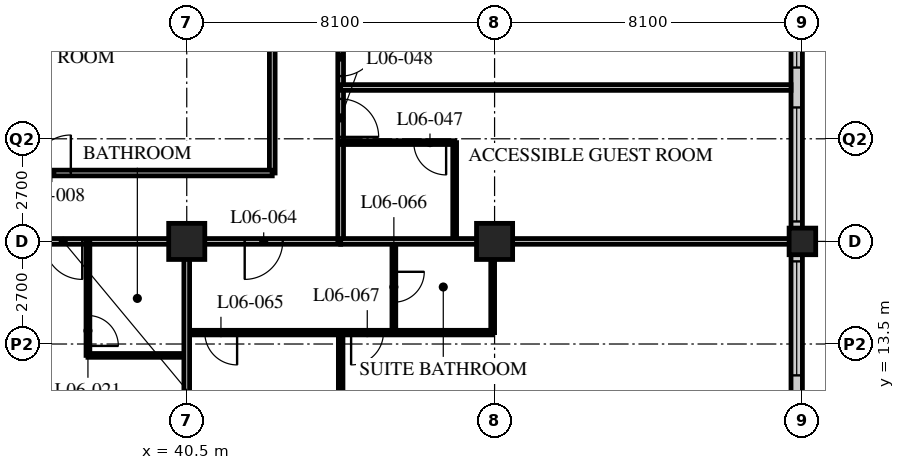
"""IFC4 building model, lengths in metres.
Left out: names, types, materials, properties, quantities, classifications, styles, units other than length and angle.
Written with IfcOpenShell. Run it as: python <this file> out.ifc"""

import sys

from ifc_helpers import new_model, si_unit, direction, frame, frame_2d, origin, origin_2d, place, context, subcontext, project, spatial, rectangle, hollow_rectangle, extrude, element, fill, save


model = new_model("IFC4")
c1 = context("Model", 3, precision=1e-05, world=origin(), true_north=direction((0.0, 1.0)))
c2 = subcontext(c1, "Body", "Model", "MODEL_VIEW")
j1 = project(units=[si_unit("LENGTHUNIT", "METRE"), si_unit("PLANEANGLEUNIT", "RADIAN")], contexts=[c1])
p1 = place(None, origin())
s1 = spatial("IfcSite", under=j1, at=p1, CompositionType="ELEMENT")
p2 = place(p1, origin())
s2 = spatial("IfcBuilding", under=s1, at=p2, CompositionType="ELEMENT")
p3 = place(p2, frame((0.0, 0.0, 33.0)))
s3 = spatial("IfcBuildingStorey", under=s2, at=p3, CompositionType="ELEMENT", Elevation=33.0)
for number, where, z_axis, x_axis in (
    (1, (40.5, 16.2, 0.0), (0.0, 0.0, 1.0), (1.0, 0.0, 0.0)),
    (2, (48.6, 16.2, 0.0), (0.0, 0.0, 1.0), (1.0, 0.0, 0.0)),
):
    element("IfcColumn", number, at=place(p3, frame(where, z_axis=z_axis, x_axis=x_axis)), inside=s3, PredefinedType="COLUMN", context=c2, shape_type="SweptSolid", body=[
        extrude(hollow_rectangle(XDim=0.95, YDim=0.95, WallThickness=0.095, at=origin_2d()), origin(), (0.0, 0.0, 1.0), 3.4),
    ])
p4 = place(p3, frame((56.7, 16.2, 0.0), z_axis=(0.0, 0.0, 1.0), x_axis=(1.0, 0.0, 0.0)))
e3 = element("IfcColumn", 3, at=p4, inside=s3, PredefinedType="COLUMN", context=c2, shape_type="SweptSolid", body=[
    extrude(hollow_rectangle(XDim=0.7, YDim=0.7, WallThickness=0.06, at=origin_2d()), origin(), (0.0, 0.0, 1.0), 3.4),
])
p5 = place(p3, frame((56.55, 8.4, 0.0), z_axis=(0.0, 0.0, 1.0), x_axis=(0.0, 1.0, 0.0)))
e4 = element("IfcWall", 4, at=p5, inside=s3, PredefinedType="SOLIDWALL", context=c2, shape_type="SweptSolid", body=[
    extrude(rectangle(XDim=32.1, YDim=0.3, at=frame_2d((16.05, 0.0))), origin(), (0.0, 0.0, 1.0), 3.19),
])
p6 = place(p5, frame((0.225, 0.0, 0.9)))
e5 = element("IfcOpeningElement", 5, at=p6, cuts=e4, PredefinedType="OPENING", context=c2, shape_type="SweptSolid", body=[
    extrude(rectangle(XDim=3.0, YDim=2.0, at=frame_2d((1.5, 1.0))), frame((0.0, 0.16, 0.0), z_axis=(0.0, -1.0, 0.0), x_axis=(1.0, 0.0, 0.0)), (0.0, 0.0, 1.0), 0.32),
])
p7 = place(p5, frame((4.275, 0.0, 0.9)))
e6 = element("IfcOpeningElement", 6, at=p7, cuts=e4, PredefinedType="OPENING", context=c2, shape_type="SweptSolid", body=[
    extrude(rectangle(XDim=3.0, YDim=2.0, at=frame_2d((1.5, 1.0))), frame((0.0, 0.16, 0.0), z_axis=(0.0, -1.0, 0.0), x_axis=(1.0, 0.0, 0.0)), (0.0, 0.0, 1.0), 0.32),
])
p8 = place(p5, frame((8.325, 0.0, 0.9)))
e7 = element("IfcOpeningElement", 7, at=p8, cuts=e4, PredefinedType="OPENING", context=c2, shape_type="SweptSolid", body=[
    extrude(rectangle(XDim=3.0, YDim=2.0, at=frame_2d((1.5, 1.0))), frame((0.0, 0.16, 0.0), z_axis=(0.0, -1.0, 0.0), x_axis=(1.0, 0.0, 0.0)), (0.0, 0.0, 1.0), 0.32),
])
p9 = place(p5, frame((12.375, 0.0, 0.9)))
e8 = element("IfcOpeningElement", 8, at=p9, cuts=e4, PredefinedType="OPENING", context=c2, shape_type="SweptSolid", body=[
    extrude(rectangle(XDim=3.0, YDim=2.0, at=frame_2d((1.5, 1.0))), frame((0.0, 0.16, 0.0), z_axis=(0.0, -1.0, 0.0), x_axis=(1.0, 0.0, 0.0)), (0.0, 0.0, 1.0), 0.32),
])
p10 = place(p5, frame((16.425, 0.0, 0.9)))
e9 = element("IfcOpeningElement", 9, at=p10, cuts=e4, PredefinedType="OPENING", context=c2, shape_type="SweptSolid", body=[
    extrude(rectangle(XDim=3.0, YDim=2.0, at=frame_2d((1.5, 1.0))), frame((0.0, 0.16, 0.0), z_axis=(0.0, -1.0, 0.0), x_axis=(1.0, 0.0, 0.0)), (0.0, 0.0, 1.0), 0.32),
])
p11 = place(p5, frame((20.475, 0.0, 0.9)))
e10 = element("IfcOpeningElement", 10, at=p11, cuts=e4, PredefinedType="OPENING", context=c2, shape_type="SweptSolid", body=[
    extrude(rectangle(XDim=3.0, YDim=2.0, at=frame_2d((1.5, 1.0))), frame((0.0, 0.16, 0.0), z_axis=(0.0, -1.0, 0.0), x_axis=(1.0, 0.0, 0.0)), (0.0, 0.0, 1.0), 0.32),
])
p12 = place(p5, frame((24.525, 0.0, 0.9)))
e11 = element("IfcOpeningElement", 11, at=p12, cuts=e4, PredefinedType="OPENING", context=c2, shape_type="SweptSolid", body=[
    extrude(rectangle(XDim=3.0, YDim=2.0, at=frame_2d((1.5, 1.0))), frame((0.0, 0.16, 0.0), z_axis=(0.0, -1.0, 0.0), x_axis=(1.0, 0.0, 0.0)), (0.0, 0.0, 1.0), 0.32),
])
p13 = place(p5, frame((28.575, 0.0, 0.9)))
e12 = element("IfcOpeningElement", 12, at=p13, cuts=e4, PredefinedType="OPENING", context=c2, shape_type="SweptSolid", body=[
    extrude(rectangle(XDim=3.0, YDim=2.0, at=frame_2d((1.5, 1.0))), frame((0.0, 0.16, 0.0), z_axis=(0.0, -1.0, 0.0), x_axis=(1.0, 0.0, 0.0)), (0.0, 0.0, 1.0), 0.32),
])
p14 = place(p3, frame((12.15, 16.2, 0.0), z_axis=(0.0, 0.0, 1.0), x_axis=(1.0, 0.0, 0.0)))
e13 = element("IfcWall", 13, at=p14, inside=s3, PredefinedType="PARTITIONING", context=c2, shape_type="SweptSolid", body=[
    extrude(rectangle(XDim=32.4, YDim=0.15, at=frame_2d((16.2, 0.0))), origin(), (0.0, 0.0, 1.0), 2.578),
])
p15 = place(p14, frame((6.5, 0.0, 0.0)))
e14 = element("IfcOpeningElement", 14, at=p15, cuts=e13, PredefinedType="OPENING", context=c2, shape_type="SweptSolid", body=[
    extrude(rectangle(XDim=1.0, YDim=2.1, at=frame_2d((0.5, 1.05))), frame((0.0, 0.085, 0.0), z_axis=(0.0, -1.0, 0.0), x_axis=(1.0, 0.0, 0.0)), (0.0, 0.0, 1.0), 0.17),
])
p16 = place(p14, frame((8.4, 0.0, 0.0)))
e15 = element("IfcOpeningElement", 15, at=p16, cuts=e13, PredefinedType="OPENING", context=c2, shape_type="SweptSolid", body=[
    extrude(rectangle(XDim=1.0, YDim=2.1, at=frame_2d((0.5, 1.05))), frame((0.0, 0.085, 0.0), z_axis=(0.0, -1.0, 0.0), x_axis=(1.0, 0.0, 0.0)), (0.0, 0.0, 1.0), 0.17),
])
p17 = place(p14, frame((14.6, 0.0, 0.0)))
e16 = element("IfcOpeningElement", 16, at=p17, cuts=e13, PredefinedType="OPENING", context=c2, shape_type="SweptSolid", body=[
    extrude(rectangle(XDim=1.0, YDim=2.1, at=frame_2d((0.5, 1.05))), frame((0.0, 0.085, 0.0), z_axis=(0.0, -1.0, 0.0), x_axis=(1.0, 0.0, 0.0)), (0.0, 0.0, 1.0), 0.17),
])
p18 = place(p14, frame((16.5, 0.0, 0.0)))
e17 = element("IfcOpeningElement", 17, at=p18, cuts=e13, PredefinedType="OPENING", context=c2, shape_type="SweptSolid", body=[
    extrude(rectangle(XDim=1.0, YDim=2.1, at=frame_2d((0.5, 1.05))), frame((0.0, 0.085, 0.0), z_axis=(0.0, -1.0, 0.0), x_axis=(1.0, 0.0, 0.0)), (0.0, 0.0, 1.0), 0.17),
])
p19 = place(p14, frame((23.0, 0.0, 0.0)))
e18 = element("IfcOpeningElement", 18, at=p19, cuts=e13, PredefinedType="OPENING", context=c2, shape_type="SweptSolid", body=[
    extrude(rectangle(XDim=1.0, YDim=2.1, at=frame_2d((0.5, 1.05))), frame((0.0, 0.085, 0.0), z_axis=(0.0, -1.0, 0.0), x_axis=(1.0, 0.0, 0.0)), (0.0, 0.0, 1.0), 0.17),
])
p20 = place(p14, frame((24.6, 0.0, 0.0)))
e19 = element("IfcOpeningElement", 19, at=p20, cuts=e13, PredefinedType="OPENING", context=c2, shape_type="SweptSolid", body=[
    extrude(rectangle(XDim=1.0, YDim=2.1, at=frame_2d((0.5, 1.05))), frame((0.0, 0.085, 0.0), z_axis=(0.0, -1.0, 0.0), x_axis=(1.0, 0.0, 0.0)), (0.0, 0.0, 1.0), 0.17),
])
p21 = place(p14, frame((1.525, 0.0, 0.0)))
e20 = element("IfcOpeningElement", 20, at=p21, cuts=e13, PredefinedType="OPENING", context=c2, shape_type="SweptSolid", body=[
    extrude(rectangle(XDim=1.0, YDim=2.1, at=frame_2d((0.5, 1.05))), frame((0.0, 0.085, 0.0), z_axis=(0.0, -1.0, 0.0), x_axis=(1.0, 0.0, 0.0)), (0.0, 0.0, 1.0), 0.17),
])
p22 = place(p14, frame((29.875, 0.0, 0.0)))
e21 = element("IfcOpeningElement", 21, at=p22, cuts=e13, PredefinedType="OPENING", context=c2, shape_type="SweptSolid", body=[
    extrude(rectangle(XDim=1.0, YDim=2.1, at=frame_2d((0.5, 1.05))), frame((0.0, 0.085, 0.0), z_axis=(0.0, -1.0, 0.0), x_axis=(1.0, 0.0, 0.0)), (0.0, 0.0, 1.0), 0.17),
])
p23 = place(p3, frame((44.55, 16.2, 0.0), z_axis=(0.0, 0.0, 1.0), x_axis=(0.0, 1.0, 0.0)))
e22 = element("IfcWall", 22, at=p23, inside=s3, PredefinedType="PARTITIONING", context=c2, shape_type="SweptSolid", body=[
    extrude(rectangle(XDim=26.1, YDim=0.15, at=frame_2d((13.05, 0.0))), origin(), (0.0, 0.0, 1.0), 3.19),
])
p24 = place(p23, frame((2.75, 0.0, 0.0)))
e23 = element("IfcOpeningElement", 23, at=p24, cuts=e22, PredefinedType="OPENING", context=c2, shape_type="SweptSolid", body=[
    extrude(rectangle(XDim=1.0, YDim=2.1, at=frame_2d((0.5, 1.05))), frame((0.0, 0.085, 0.0), z_axis=(0.0, -1.0, 0.0), x_axis=(1.0, 0.0, 0.0)), (0.0, 0.0, 1.0), 0.17),
])
p25 = place(p23, frame((4.35, 0.0, 0.0)))
e24 = element("IfcOpeningElement", 24, at=p25, cuts=e22, PredefinedType="OPENING", context=c2, shape_type="SweptSolid", body=[
    extrude(rectangle(XDim=1.0, YDim=2.1, at=frame_2d((0.5, 1.05))), frame((0.0, 0.085, 0.0), z_axis=(0.0, -1.0, 0.0), x_axis=(1.0, 0.0, 0.0)), (0.0, 0.0, 1.0), 0.17),
])
p26 = place(p23, frame((8.4, 0.0, 0.0)))
e25 = element("IfcOpeningElement", 25, at=p26, cuts=e22, PredefinedType="OPENING", context=c2, shape_type="SweptSolid", body=[
    extrude(rectangle(XDim=1.0, YDim=2.1, at=frame_2d((0.5, 1.05))), frame((0.0, 0.085, 0.0), z_axis=(0.0, -1.0, 0.0), x_axis=(1.0, 0.0, 0.0)), (0.0, 0.0, 1.0), 0.17),
])
p27 = place(p23, frame((14.6, 0.0, 0.0)))
e26 = element("IfcOpeningElement", 26, at=p27, cuts=e22, PredefinedType="OPENING", context=c2, shape_type="SweptSolid", body=[
    extrude(rectangle(XDim=1.0, YDim=2.1, at=frame_2d((0.5, 1.05))), frame((0.0, 0.085, 0.0), z_axis=(0.0, -1.0, 0.0), x_axis=(1.0, 0.0, 0.0)), (0.0, 0.0, 1.0), 0.17),
])
p28 = place(p23, frame((18.65, 0.0, 0.0)))
e27 = element("IfcOpeningElement", 27, at=p28, cuts=e22, PredefinedType="OPENING", context=c2, shape_type="SweptSolid", body=[
    extrude(rectangle(XDim=1.0, YDim=2.1, at=frame_2d((0.5, 1.05))), frame((0.0, 0.085, 0.0), z_axis=(0.0, -1.0, 0.0), x_axis=(1.0, 0.0, 0.0)), (0.0, 0.0, 1.0), 0.17),
])
p29 = place(p23, frame((22.65, 0.0, 0.0)))
e28 = element("IfcOpeningElement", 28, at=p29, cuts=e22, PredefinedType="OPENING", context=c2, shape_type="SweptSolid", body=[
    extrude(rectangle(XDim=1.0, YDim=2.1, at=frame_2d((0.5, 1.05))), frame((0.0, 0.085, 0.0), z_axis=(0.0, -1.0, 0.0), x_axis=(1.0, 0.0, 0.0)), (0.0, 0.0, 1.0), 0.17),
])
p30 = place(p3, frame((42.75, 18.0, 0.0), z_axis=(0.0, 0.0, 1.0), x_axis=(0.0, 1.0, 0.0)))
e29 = element("IfcWall", 29, at=p30, inside=s3, PredefinedType="PARTITIONING", context=c2, shape_type="SweptSolid", body=[
    extrude(rectangle(XDim=22.5, YDim=0.15, at=frame_2d((11.25, 0.0))), origin(), (0.0, 0.0, 1.0), 3.19),
])
p31 = place(p30, frame((9.85, 0.0, 0.0)))
e30 = element("IfcOpeningElement", 30, at=p31, cuts=e29, PredefinedType="OPENING", context=c2, shape_type="SweptSolid", body=[
    extrude(rectangle(XDim=1.0, YDim=2.1, at=frame_2d((0.5, 1.05))), frame((0.0, 0.085, 0.0), z_axis=(0.0, -1.0, 0.0), x_axis=(1.0, 0.0, 0.0)), (0.0, 0.0, 1.0), 0.17),
])
p32 = place(p30, frame((17.95, 0.0, 0.0)))
e31 = element("IfcOpeningElement", 31, at=p32, cuts=e29, PredefinedType="OPENING", context=c2, shape_type="SweptSolid", body=[
    extrude(rectangle(XDim=1.0, YDim=2.1, at=frame_2d((0.5, 1.05))), frame((0.0, 0.085, 0.0), z_axis=(0.0, -1.0, 0.0), x_axis=(1.0, 0.0, 0.0)), (0.0, 0.0, 1.0), 0.17),
])
p33 = place(p3, frame((29.56, 18.0, 0.0), z_axis=(0.0, 0.0, 1.0), x_axis=(1.0, 0.0, 0.0)))
e32 = element("IfcWall", 32, at=p33, inside=s3, PredefinedType="PARTITIONING", context=c2, shape_type="SweptSolid", body=[
    extrude(rectangle(XDim=13.19, YDim=0.15, at=frame_2d((6.595, 0.0))), origin(), (0.0, 0.0, 1.0), 3.19),
])
p34 = place(p33, frame((0.29, 0.0, 0.0)))
e33 = element("IfcOpeningElement", 33, at=p34, cuts=e32, PredefinedType="OPENING", context=c2, shape_type="SweptSolid", body=[
    extrude(rectangle(XDim=1.0, YDim=2.1, at=frame_2d((0.5, 1.05))), frame((0.0, 0.085, 0.0), z_axis=(0.0, -1.0, 0.0), x_axis=(1.0, 0.0, 0.0)), (0.0, 0.0, 1.0), 0.17),
])
p35 = place(p33, frame((6.89, 0.0, 0.0)))
e34 = element("IfcOpeningElement", 34, at=p35, cuts=e32, PredefinedType="OPENING", context=c2, shape_type="SweptSolid", body=[
    extrude(rectangle(XDim=1.0, YDim=2.1, at=frame_2d((0.5, 1.05))), frame((0.0, 0.085, 0.0), z_axis=(0.0, -1.0, 0.0), x_axis=(1.0, 0.0, 0.0)), (0.0, 0.0, 1.0), 0.17),
])
p36 = place(p3, frame((37.9, 13.2, 0.0), z_axis=(0.0, 0.0, 1.0), x_axis=(1.0, 0.0, 0.0)))
e35 = element("IfcWall", 35, at=p36, inside=s3, PredefinedType="PARTITIONING", context=c2, shape_type="SweptSolid", body=[
    extrude(rectangle(XDim=2.6, YDim=0.1, at=frame_2d((1.3, 0.0))), origin(), (0.0, 0.0, 1.0), 3.19),
])
p37 = place(p3, frame((37.9, 16.2, 0.0), z_axis=(0.0, 0.0, 1.0), x_axis=(0.0, -1.0, 0.0)))
e36 = element("IfcWall", 36, at=p37, inside=s3, PredefinedType="PARTITIONING", context=c2, shape_type="SweptSolid", body=[
    extrude(rectangle(XDim=3.0, YDim=0.1, at=frame_2d((1.5, 0.0))), origin(), (0.0, 0.0, 1.0), 3.19),
])
p38 = place(p37, frame((1.95, 0.0, 0.0)))
e37 = element("IfcOpeningElement", 37, at=p38, cuts=e36, PredefinedType="OPENING", context=c2, shape_type="SweptSolid", body=[
    extrude(rectangle(XDim=0.8, YDim=2.1, at=frame_2d((0.4, 1.05))), frame((0.0, 0.06, 0.0), z_axis=(0.0, -1.0, 0.0), x_axis=(1.0, 0.0, 0.0)), (0.0, 0.0, 1.0), 0.12),
])
p39 = place(p3, frame((47.55, 16.2, 0.0), z_axis=(0.0, 0.0, 1.0), x_axis=(0.0, 1.0, 0.0)))
e38 = element("IfcWall", 38, at=p39, inside=s3, PredefinedType="PARTITIONING", context=c2, shape_type="SweptSolid", body=[
    extrude(rectangle(XDim=2.6, YDim=0.1, at=frame_2d((1.3, 0.0))), origin(), (0.0, 0.0, 1.0), 3.19),
])
p40 = place(p3, frame((44.55, 18.8, 0.0), z_axis=(0.0, 0.0, 1.0), x_axis=(1.0, 0.0, 0.0)))
e39 = element("IfcWall", 39, at=p40, inside=s3, PredefinedType="PARTITIONING", context=c2, shape_type="SweptSolid", body=[
    extrude(rectangle(XDim=3.0, YDim=0.1, at=frame_2d((1.5, 0.0))), origin(), (0.0, 0.0, 1.0), 3.19),
])
p41 = place(p40, frame((1.925, 0.0, 0.0)))
e40 = element("IfcOpeningElement", 40, at=p41, cuts=e39, PredefinedType="OPENING", context=c2, shape_type="SweptSolid", body=[
    extrude(rectangle(XDim=0.85, YDim=2.1, at=frame_2d((0.425, 1.05))), frame((0.0, 0.06, 0.0), z_axis=(0.0, -1.0, 0.0), x_axis=(1.0, 0.0, 0.0)), (0.0, 0.0, 1.0), 0.12),
])
p42 = place(p3, frame((44.55, 20.25, 0.0), z_axis=(0.0, 0.0, 1.0), x_axis=(1.0, 0.0, 0.0)))
e41 = element("IfcWall", 41, at=p42, inside=s3, PredefinedType="PARTITIONING", context=c2, shape_type="SweptSolid", body=[
    extrude(rectangle(XDim=11.85, YDim=0.15, at=frame_2d((5.925, 0.0))), origin(), (0.0, 0.0, 1.0), 3.19),
])
p43 = place(p3, frame((40.5, 13.8, 0.0), z_axis=(0.0, 0.0, 1.0), x_axis=(1.0, 0.0, 0.0)))
e42 = element("IfcWall", 42, at=p43, inside=s3, PredefinedType="PARTITIONING", context=c2, shape_type="SweptSolid", body=[
    extrude(rectangle(XDim=8.05, YDim=0.12, at=frame_2d((4.025, 0.0))), origin(), (0.0, 0.0, 1.0), 3.19),
])
p44 = place(p43, frame((0.475, 0.0, 0.0)))
e43 = element("IfcOpeningElement", 43, at=p44, cuts=e42, PredefinedType="OPENING", context=c2, shape_type="SweptSolid", body=[
    extrude(rectangle(XDim=0.85, YDim=2.1, at=frame_2d((0.425, 1.05))), frame((0.0, 0.07, 0.0), z_axis=(0.0, -1.0, 0.0), x_axis=(1.0, 0.0, 0.0)), (0.0, 0.0, 1.0), 0.14),
])
p45 = place(p43, frame((4.325, 0.0, 0.0)))
e44 = element("IfcOpeningElement", 44, at=p45, cuts=e42, PredefinedType="OPENING", context=c2, shape_type="SweptSolid", body=[
    extrude(rectangle(XDim=0.85, YDim=2.1, at=frame_2d((0.425, 1.05))), frame((0.0, 0.07, 0.0), z_axis=(0.0, -1.0, 0.0), x_axis=(1.0, 0.0, 0.0)), (0.0, 0.0, 1.0), 0.14),
])
p46 = place(p3, frame((45.95, 16.2, 0.0), z_axis=(0.0, 0.0, 1.0), x_axis=(0.0, -1.0, 0.0)))
e45 = element("IfcWall", 45, at=p46, inside=s3, PredefinedType="PARTITIONING", context=c2, shape_type="SweptSolid", body=[
    extrude(rectangle(XDim=2.4, YDim=0.1, at=frame_2d((1.2, 0.0))), origin(), (0.0, 0.0, 1.0), 3.19),
])
p47 = place(p46, frame((0.8, 0.0, 0.0)))
e46 = element("IfcOpeningElement", 46, at=p47, cuts=e45, PredefinedType="OPENING", context=c2, shape_type="SweptSolid", body=[
    extrude(rectangle(XDim=0.8, YDim=2.1, at=frame_2d((0.4, 1.05))), frame((0.0, 0.06, 0.0), z_axis=(0.0, -1.0, 0.0), x_axis=(1.0, 0.0, 0.0)), (0.0, 0.0, 1.0), 0.12),
])
p48 = place(p3, frame((48.55, 16.2, 0.0), z_axis=(0.0, 0.0, 1.0), x_axis=(0.0, -1.0, 0.0)))
e47 = element("IfcWall", 47, at=p48, inside=s3, PredefinedType="PARTITIONING", context=c2, shape_type="SweptSolid", body=[
    extrude(rectangle(XDim=2.4, YDim=0.1, at=frame_2d((1.2, 0.0))), origin(), (0.0, 0.0, 1.0), 2.578),
])
p49 = place(p3, frame((44.55, 13.8, 0.0), z_axis=(0.0, 0.0, 1.0), x_axis=(0.0, -1.0, 0.0)))
e48 = element("IfcWall", 48, at=p49, inside=s3, PredefinedType="PARTITIONING", context=c2, shape_type="SweptSolid", body=[
    extrude(rectangle(XDim=13.5, YDim=0.12, at=frame_2d((6.75, 0.0))), origin(), (0.0, 0.0, 1.0), 3.19),
])
p50 = place(p3, frame((44.55, 16.2, 0.0), z_axis=(0.0, 0.0, 1.0), x_axis=(1.0, 0.0, 0.0)))
e49 = element("IfcWall", 49, at=p50, inside=s3, PredefinedType="PARTITIONING", context=c2, shape_type="SweptSolid", body=[
    extrude(rectangle(XDim=11.85, YDim=0.15, at=frame_2d((5.925, 0.0))), origin(), (0.0, 0.0, 1.0), 2.578),
])
p51 = place(p3, frame((40.5, 16.2, 0.0), z_axis=(0.0, 0.0, 1.0), x_axis=(0.0, -1.0, 0.0)))
e50 = element("IfcWall", 50, at=p51, inside=s3, PredefinedType="PARTITIONING", context=c2, shape_type="SweptSolid", body=[
    extrude(rectangle(XDim=15.9, YDim=0.15, at=frame_2d((7.95, 0.0))), origin(), (0.0, 0.0, 1.0), 2.578),
])
p52 = place(p7, origin())
e51 = element("IfcWindow", 51, at=p52, inside=s3, PartitioningType="SINGLE_PANEL", PredefinedType="WINDOW", context=c2, shape_type="SweptSolid", body=[
    extrude(rectangle(XDim=3.0, YDim=2.0, at=frame_2d((1.5, 1.0))), frame((0.0, 0.03, 0.0), z_axis=(0.0, -1.0, 0.0), x_axis=(1.0, 0.0, 0.0)), (0.0, 0.0, 1.0), 0.06),
])
fill(e6, e51)
p53 = place(p8, origin())
e52 = element("IfcWindow", 52, at=p53, inside=s3, PartitioningType="SINGLE_PANEL", PredefinedType="WINDOW", context=c2, shape_type="SweptSolid", body=[
    extrude(rectangle(XDim=3.0, YDim=2.0, at=frame_2d((1.5, 1.0))), frame((0.0, 0.03, 0.0), z_axis=(0.0, -1.0, 0.0), x_axis=(1.0, 0.0, 0.0)), (0.0, 0.0, 1.0), 0.06),
])
fill(e7, e52)
p54 = place(p9, origin())
e53 = element("IfcWindow", 53, at=p54, inside=s3, PartitioningType="SINGLE_PANEL", PredefinedType="WINDOW", context=c2, shape_type="SweptSolid", body=[
    extrude(rectangle(XDim=3.0, YDim=2.0, at=frame_2d((1.5, 1.0))), frame((0.0, 0.03, 0.0), z_axis=(0.0, -1.0, 0.0), x_axis=(1.0, 0.0, 0.0)), (0.0, 0.0, 1.0), 0.06),
])
fill(e8, e53)
p55 = place(p35, origin())
e54 = element("IfcDoor", 54, at=p55, inside=s3, OperationType="SINGLE_SWING_RIGHT", PredefinedType="DOOR", context=c2, shape_type="SweptSolid", body=[
    extrude(rectangle(XDim=1.0, YDim=2.1, at=frame_2d((0.5, 1.05))), frame((0.0, 0.025, 0.0), z_axis=(0.0, -1.0, 0.0), x_axis=(1.0, 0.0, 0.0)), (0.0, 0.0, 1.0), 0.05),
])
fill(e34, e54)
p56 = place(p38, origin())
e55 = element("IfcDoor", 55, at=p56, inside=s3, OperationType="SINGLE_SWING_RIGHT", PredefinedType="DOOR", context=c2, shape_type="SweptSolid", body=[
    extrude(rectangle(XDim=0.8, YDim=2.1, at=frame_2d((0.4, 1.05))), frame((0.0, 0.025, 0.0), z_axis=(0.0, -1.0, 0.0), x_axis=(1.0, 0.0, 0.0)), (0.0, 0.0, 1.0), 0.05),
])
fill(e37, e55)
p57 = place(p20, origin())
e56 = element("IfcDoor", 56, at=p57, inside=s3, OperationType="SINGLE_SWING_LEFT", PredefinedType="DOOR", context=c2, shape_type="SweptSolid", body=[
    extrude(rectangle(XDim=1.0, YDim=2.1, at=frame_2d((0.5, 1.05))), frame((0.0, 0.025, 0.0), z_axis=(0.0, -1.0, 0.0), x_axis=(1.0, 0.0, 0.0)), (0.0, 0.0, 1.0), 0.05),
])
fill(e19, e56)
p58 = place(p41, origin())
e57 = element("IfcDoor", 57, at=p58, inside=s3, OperationType="SINGLE_SWING_LEFT", PredefinedType="DOOR", context=c2, shape_type="SweptSolid", body=[
    extrude(rectangle(XDim=0.85, YDim=2.1, at=frame_2d((0.425, 1.05))), frame((0.0, 0.025, 0.0), z_axis=(0.0, -1.0, 0.0), x_axis=(1.0, 0.0, 0.0)), (0.0, 0.0, 1.0), 0.05),
])
fill(e40, e57)
p59 = place(p24, origin())
e58 = element("IfcDoor", 58, at=p59, inside=s3, OperationType="SINGLE_SWING_RIGHT", PredefinedType="DOOR", context=c2, shape_type="SweptSolid", body=[
    extrude(rectangle(XDim=1.0, YDim=2.1, at=frame_2d((0.5, 1.05))), frame((0.0, 0.025, 0.0), z_axis=(0.0, -1.0, 0.0), x_axis=(1.0, 0.0, 0.0)), (0.0, 0.0, 1.0), 0.05),
])
fill(e23, e58)
p60 = place(p25, origin())
e59 = element("IfcDoor", 59, at=p60, inside=s3, OperationType="SINGLE_SWING_LEFT", PredefinedType="DOOR", context=c2, shape_type="SweptSolid", body=[
    extrude(rectangle(XDim=1.0, YDim=2.1, at=frame_2d((0.5, 1.05))), frame((0.0, 0.025, 0.0), z_axis=(0.0, -1.0, 0.0), x_axis=(1.0, 0.0, 0.0)), (0.0, 0.0, 1.0), 0.05),
])
fill(e24, e59)
p61 = place(p22, origin())
e60 = element("IfcDoor", 60, at=p61, inside=s3, OperationType="SINGLE_SWING_RIGHT", PredefinedType="DOOR", context=c2, shape_type="SweptSolid", body=[
    extrude(rectangle(XDim=1.0, YDim=2.1, at=frame_2d((0.5, 1.05))), frame((0.0, 0.025, 0.0), z_axis=(0.0, -1.0, 0.0), x_axis=(1.0, 0.0, 0.0)), (0.0, 0.0, 1.0), 0.05),
])
fill(e21, e60)
p62 = place(p44, origin())
e61 = element("IfcDoor", 61, at=p62, inside=s3, OperationType="SINGLE_SWING_LEFT", PredefinedType="DOOR", context=c2, shape_type="SweptSolid", body=[
    extrude(rectangle(XDim=0.85, YDim=2.1, at=frame_2d((0.425, 1.05))), frame((0.0, 0.025, 0.0), z_axis=(0.0, -1.0, 0.0), x_axis=(1.0, 0.0, 0.0)), (0.0, 0.0, 1.0), 0.05),
])
fill(e43, e61)
p63 = place(p47, origin())
e62 = element("IfcDoor", 62, at=p63, inside=s3, OperationType="SINGLE_SWING_LEFT", PredefinedType="DOOR", context=c2, shape_type="SweptSolid", body=[
    extrude(rectangle(XDim=0.8, YDim=2.1, at=frame_2d((0.4, 1.05))), frame((0.0, 0.025, 0.0), z_axis=(0.0, -1.0, 0.0), x_axis=(1.0, 0.0, 0.0)), (0.0, 0.0, 1.0), 0.05),
])
fill(e46, e62)
p64 = place(p45, origin())
e63 = element("IfcDoor", 63, at=p64, inside=s3, OperationType="SINGLE_SWING_RIGHT", PredefinedType="DOOR", context=c2, shape_type="SweptSolid", body=[
    extrude(rectangle(XDim=0.85, YDim=2.1, at=frame_2d((0.425, 1.05))), frame((0.0, 0.025, 0.0), z_axis=(0.0, -1.0, 0.0), x_axis=(1.0, 0.0, 0.0)), (0.0, 0.0, 1.0), 0.05),
])
fill(e44, e63)
save(model, sys.argv[1])
